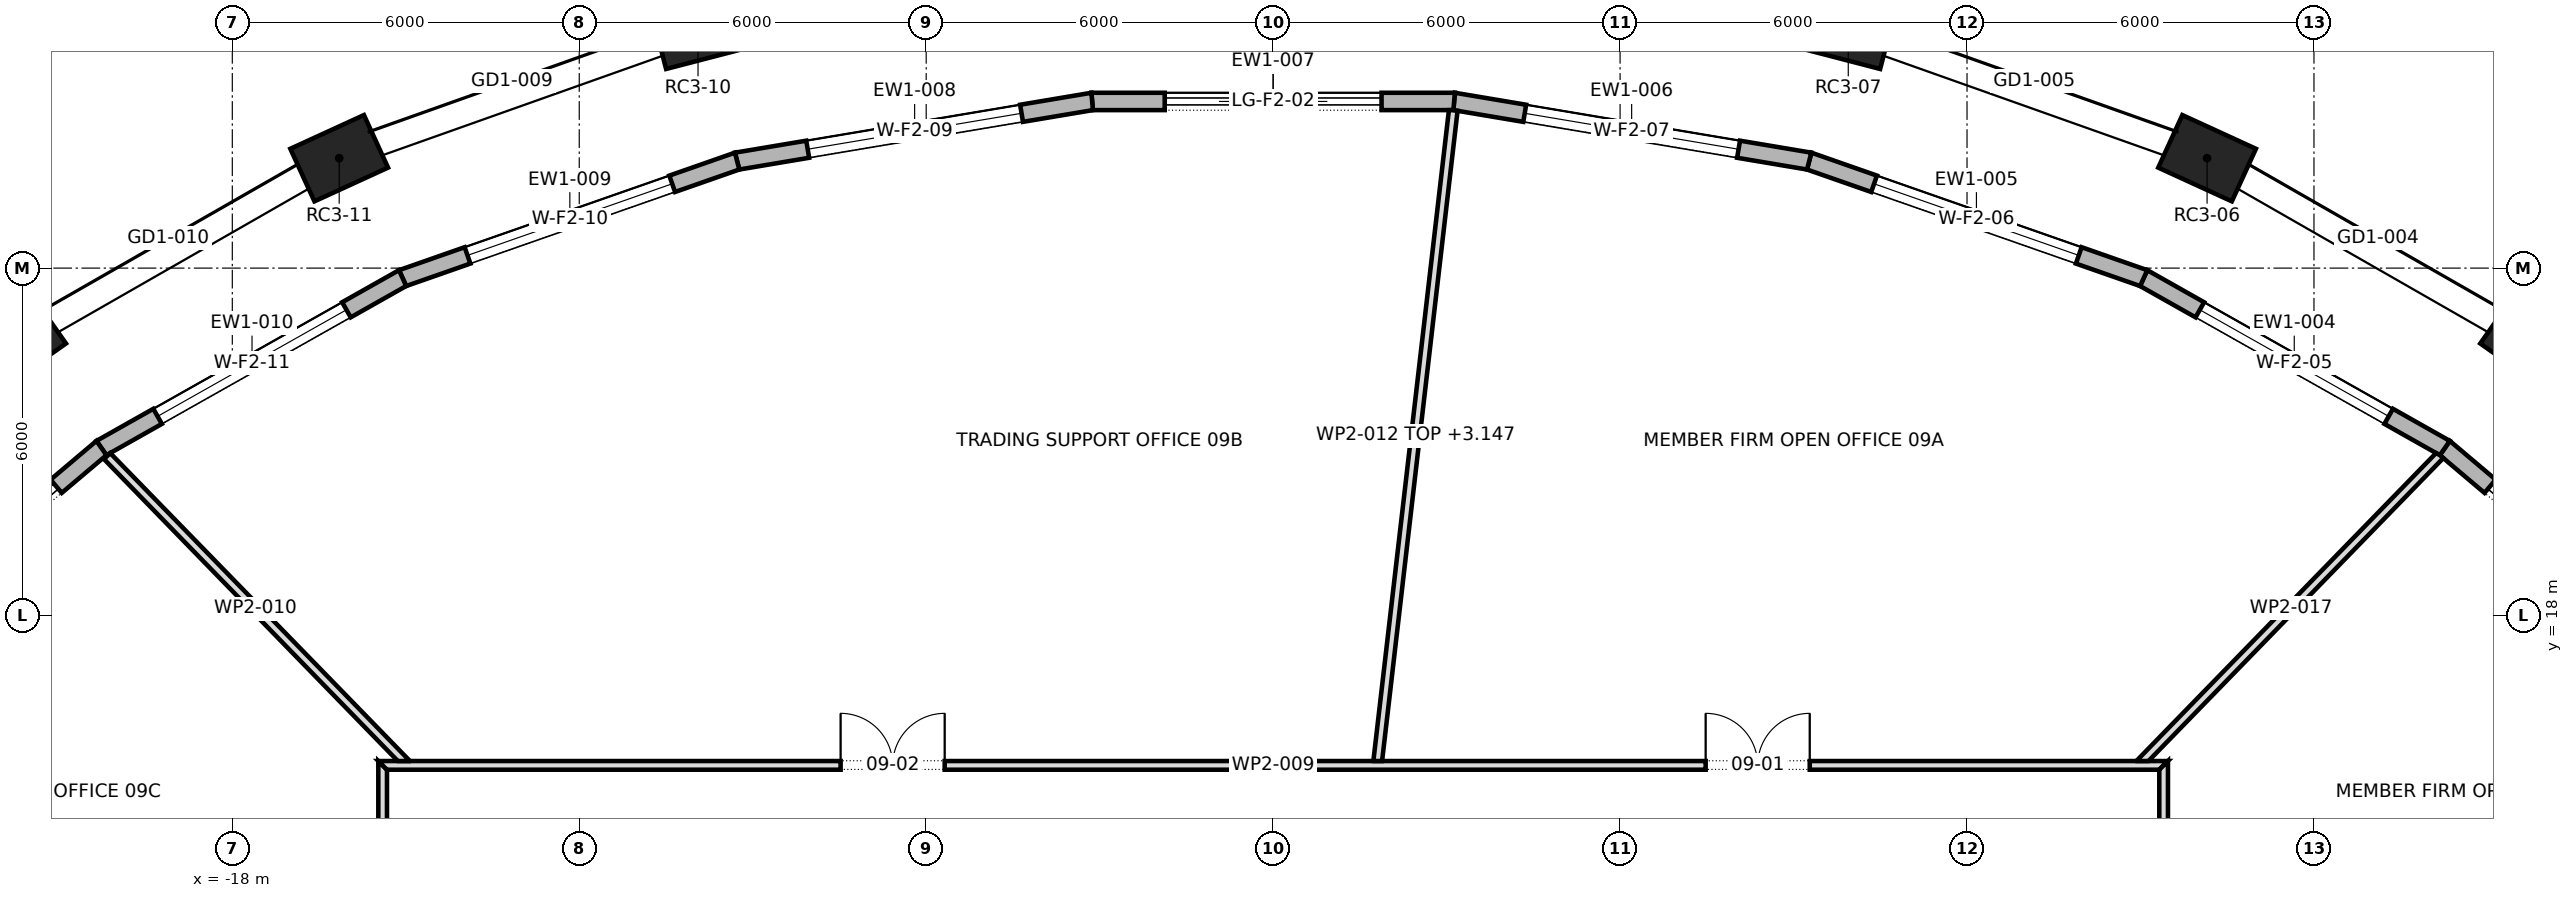
"""IFC4 building model, lengths in metres.
Left out: names, types, materials, properties, quantities, classifications, styles, units other than length and angle.
Written with IfcOpenShell. Run it as: python <this file> out.ifc"""

import sys

from ifc_helpers import new_model, si_unit, direction, frame, frame_2d, origin, origin_2d, place, context, subcontext, project, spatial, polyline, rectangle, outline, extrude, element, fill, save


model = new_model("IFC4")
c1 = context("Model", 3, precision=1e-05, world=origin(), true_north=direction((0.0, 1.0)))
c2 = subcontext(c1, "Body", "Model", "MODEL_VIEW")
j1 = project(units=[si_unit("LENGTHUNIT", "METRE"), si_unit("PLANEANGLEUNIT", "RADIAN")], contexts=[c1])
p1 = place(None, origin())
s1 = spatial("IfcSite", under=j1, at=p1, CompositionType="ELEMENT")
p2 = place(p1, origin())
s2 = spatial("IfcBuilding", under=s1, at=p2, CompositionType="ELEMENT")
p3 = place(p2, frame((0.0, 0.0, 138.1)))
s3 = spatial("IfcBuildingStorey", under=s2, at=p3, CompositionType="ELEMENT", Elevation=138.1)
for number, where, z_axis, x_axis in (
    (1, (21.736, 22.702, 0.0), (0.0, 0.0, 1.0), (-0.818, 0.575, 0.0)),
    (2, (16.152, 25.901, 0.0), (0.0, 0.0, 1.0), (-0.909, 0.417, 0.0)),
    (3, (9.946, 28.104, 0.0), (0.0, 0.0, 1.0), (-0.968, 0.252, 0.0)),
    (4, (-9.946, 28.104, 0.0), (0.0, 0.0, 1.0), (-0.968, -0.252, 0.0)),
    (5, (-16.152, 25.901, 0.0), (0.0, 0.0, 1.0), (-0.909, -0.417, 0.0)),
    (6, (-21.736, 22.702, 0.0), (0.0, 0.0, 1.0), (-0.818, -0.575, 0.0)),
):
    element("IfcColumn", number, at=place(p3, frame(where, z_axis=z_axis, x_axis=x_axis)), inside=s3, PredefinedType="COLUMN", context=c2, shape_type="SweptSolid", body=[
        extrude(rectangle(XDim=1.4, YDim=1.0, at=origin_2d()), origin(), (0.0, 0.0, 1.0), 4.2),
    ])
p4 = place(p3, frame((24.694, 17.146, 0.0), z_axis=(0.0, 0.0, 1.0), x_axis=(-0.763963973896, 0.645258898884, 0.0)))
e7 = element("IfcWall", 7, at=p4, inside=s3, PredefinedType="STANDARD", context=c2, shape_type="SweptSolid", body=[
    extrude(outline(polyline([(-0.015, -0.15), (5.814, -0.15), (5.786, 0.15), (0.015, 0.15), (-0.015, -0.15)])), origin(), (0.0, 0.0, 1.0), 3.9),
])
p5 = place(p4, frame((1.025, 0.0, 0.0)))
e8 = element("IfcOpeningElement", 8, at=p5, cuts=e7, PredefinedType="OPENING", context=c2, shape_type="SweptSolid", body=[
    extrude(rectangle(XDim=3.75, YDim=3.45, at=frame_2d((1.875, 1.725))), frame((0.0, 0.162, 0.0), z_axis=(0.0, -1.0, 0.0), x_axis=(1.0, 0.0, 0.0)), (0.0, 0.0, 1.0), 0.324),
])
p6 = place(p3, frame((20.263, 20.888, 0.0), z_axis=(0.0, 0.0, 1.0), x_axis=(-0.87090857883, 0.491445060327, 0.0)))
e9 = element("IfcWall", 9, at=p6, inside=s3, PredefinedType="STANDARD", context=c2, shape_type="SweptSolid", body=[
    extrude(outline(polyline([(-0.014, -0.15), (5.994, -0.15), (5.967, 0.15), (0.014, 0.15), (-0.014, -0.15)])), origin(), (0.0, 0.0, 1.0), 3.9),
])
p7 = place(p6, frame((1.115, 0.0, 0.6)))
e10 = element("IfcOpeningElement", 10, at=p7, cuts=e9, PredefinedType="OPENING", context=c2, shape_type="SweptSolid", body=[
    extrude(rectangle(XDim=3.75, YDim=2.85, at=frame_2d((1.875, 1.425))), frame((0.0, 0.162, 0.0), z_axis=(0.0, -1.0, 0.0), x_axis=(1.0, 0.0, 0.0)), (0.0, 0.0, 1.0), 0.324),
])
p8 = place(p3, frame((15.055, 23.827, 0.0), z_axis=(0.0, 0.0, 1.0), x_axis=(-0.943911133508, 0.330199594245, 0.0)))
e11 = element("IfcWall", 11, at=p8, inside=s3, PredefinedType="STANDARD", context=c2, shape_type="SweptSolid", body=[
    extrude(outline(polyline([(-0.013, -0.15), (6.141, -0.15), (6.116, 0.15), (0.013, 0.15), (-0.013, -0.15)])), origin(), (0.0, 0.0, 1.0), 3.9),
])
p9 = place(p8, frame((1.189, 0.0, 0.6)))
e12 = element("IfcOpeningElement", 12, at=p9, cuts=e11, PredefinedType="OPENING", context=c2, shape_type="SweptSolid", body=[
    extrude(rectangle(XDim=3.75, YDim=2.85, at=frame_2d((1.875, 1.425))), frame((0.0, 0.162, 0.0), z_axis=(0.0, -1.0, 0.0), x_axis=(1.0, 0.0, 0.0)), (0.0, 0.0, 1.0), 0.324),
])
p10 = place(p3, frame((9.27, 25.851, 0.0), z_axis=(0.0, 0.0, 1.0), x_axis=(-0.9861811474, 0.165670590368, 0.0)))
e13 = element("IfcWall", 13, at=p10, inside=s3, PredefinedType="STANDARD", context=c2, shape_type="SweptSolid", body=[
    extrude(outline(polyline([(-0.013, -0.15), (6.239, -0.15), (6.214, 0.15), (0.013, 0.15), (-0.013, -0.15)])), origin(), (0.0, 0.0, 1.0), 3.9),
])
p11 = place(p10, frame((1.238, 0.0, 0.6)))
e14 = element("IfcOpeningElement", 14, at=p11, cuts=e13, PredefinedType="OPENING", context=c2, shape_type="SweptSolid", body=[
    extrude(rectangle(XDim=3.75, YDim=2.85, at=frame_2d((1.875, 1.425))), frame((0.0, 0.162, 0.0), z_axis=(0.0, -1.0, 0.0), x_axis=(1.0, 0.0, 0.0)), (0.0, 0.0, 1.0), 0.324),
])
p12 = place(p3, frame((3.13, 26.882, 0.0), z_axis=(0.0, 0.0, 1.0), x_axis=(-1.0, 0.0, 0.0)))
e15 = element("IfcWall", 15, at=p12, inside=s3, PredefinedType="STANDARD", context=c2, shape_type="SweptSolid", body=[
    extrude(outline(polyline([(-0.012, -0.15), (6.272, -0.15), (6.247, 0.15), (0.012, 0.15), (-0.012, -0.15)])), origin(), (0.0, 0.0, 1.0), 3.9),
])
p13 = place(p12, frame((1.255, 0.0, 0.0)))
e16 = element("IfcOpeningElement", 16, at=p13, cuts=e15, PredefinedType="OPENING", context=c2, shape_type="SweptSolid", body=[
    extrude(rectangle(XDim=3.75, YDim=3.45, at=frame_2d((1.875, 1.725))), frame((0.0, 0.162, 0.0), z_axis=(0.0, -1.0, 0.0), x_axis=(1.0, 0.0, 0.0)), (0.0, 0.0, 1.0), 0.324),
])
p14 = place(p3, frame((-3.13, 26.882, 0.0), z_axis=(0.0, 0.0, 1.0), x_axis=(-0.9861811474, -0.165670590368, 0.0)))
e17 = element("IfcWall", 17, at=p14, inside=s3, PredefinedType="STANDARD", context=c2, shape_type="SweptSolid", body=[
    extrude(outline(polyline([(-0.012, -0.15), (6.239, -0.15), (6.213, 0.15), (0.012, 0.15), (-0.012, -0.15)])), origin(), (0.0, 0.0, 1.0), 3.9),
])
p15 = place(p14, frame((1.238, 0.0, 0.6)))
e18 = element("IfcOpeningElement", 18, at=p15, cuts=e17, PredefinedType="OPENING", context=c2, shape_type="SweptSolid", body=[
    extrude(rectangle(XDim=3.75, YDim=2.85, at=frame_2d((1.875, 1.425))), frame((0.0, 0.162, 0.0), z_axis=(0.0, -1.0, 0.0), x_axis=(1.0, 0.0, 0.0)), (0.0, 0.0, 1.0), 0.324),
])
p16 = place(p3, frame((-9.27, 25.851, 0.0), z_axis=(0.0, 0.0, 1.0), x_axis=(-0.943911133508, -0.330199594245, 0.0)))
e19 = element("IfcWall", 19, at=p16, inside=s3, PredefinedType="STANDARD", context=c2, shape_type="SweptSolid", body=[
    extrude(outline(polyline([(-0.013, -0.15), (6.142, -0.15), (6.115, 0.15), (0.013, 0.15), (-0.013, -0.15)])), origin(), (0.0, 0.0, 1.0), 3.9),
])
p17 = place(p16, frame((1.189, 0.0, 0.6)))
e20 = element("IfcOpeningElement", 20, at=p17, cuts=e19, PredefinedType="OPENING", context=c2, shape_type="SweptSolid", body=[
    extrude(rectangle(XDim=3.75, YDim=2.85, at=frame_2d((1.875, 1.425))), frame((0.0, 0.162, 0.0), z_axis=(0.0, -1.0, 0.0), x_axis=(1.0, 0.0, 0.0)), (0.0, 0.0, 1.0), 0.324),
])
p18 = place(p3, frame((-15.055, 23.827, 0.0), z_axis=(0.0, 0.0, 1.0), x_axis=(-0.87090857883, -0.491445060327, 0.0)))
e21 = element("IfcWall", 21, at=p18, inside=s3, PredefinedType="STANDARD", context=c2, shape_type="SweptSolid", body=[
    extrude(outline(polyline([(-0.013, -0.15), (5.994, -0.15), (5.966, 0.15), (0.013, 0.15), (-0.013, -0.15)])), origin(), (0.0, 0.0, 1.0), 3.9),
])
p19 = place(p18, frame((1.115, 0.0, 0.6)))
e22 = element("IfcOpeningElement", 22, at=p19, cuts=e21, PredefinedType="OPENING", context=c2, shape_type="SweptSolid", body=[
    extrude(rectangle(XDim=3.75, YDim=2.85, at=frame_2d((1.875, 1.425))), frame((0.0, 0.162, 0.0), z_axis=(0.0, -1.0, 0.0), x_axis=(1.0, 0.0, 0.0)), (0.0, 0.0, 1.0), 0.324),
])
p20 = place(p3, frame((-20.263, 20.888, 0.0), z_axis=(0.0, 0.0, 1.0), x_axis=(-0.763963973896, -0.645258898884, 0.0)))
e23 = element("IfcWall", 23, at=p20, inside=s3, PredefinedType="STANDARD", context=c2, shape_type="SweptSolid", body=[
    extrude(outline(polyline([(-0.014, -0.15), (5.815, -0.15), (5.785, 0.15), (0.014, 0.15), (-0.014, -0.15)])), origin(), (0.0, 0.0, 1.0), 3.9),
])
p21 = place(p20, frame((1.025, 0.0, 0.0)))
e24 = element("IfcOpeningElement", 24, at=p21, cuts=e23, PredefinedType="OPENING", context=c2, shape_type="SweptSolid", body=[
    extrude(rectangle(XDim=3.75, YDim=3.45, at=frame_2d((1.875, 1.725))), frame((0.0, 0.162, 0.0), z_axis=(0.0, -1.0, 0.0), x_axis=(1.0, 0.0, 0.0)), (0.0, 0.0, 1.0), 0.324),
])
p22 = place(p3, frame((-15.4, -3.16, 0.0), z_axis=(0.0, 0.0, 1.0), x_axis=(0.0, 1.0, 0.0)))
e25 = element("IfcWall", 25, at=p22, inside=s3, PredefinedType="PARTITIONING", context=c2, shape_type="SweptSolid", body=[
    extrude(outline(polyline([(0.0, -0.075), (1.848, -0.075), (3.697, -0.075), (5.545, -0.075), (7.394, -0.075), (9.242, -0.075), (11.091, -0.075), (12.939, -0.075), (14.788, -0.075), (16.636, -0.075), (18.485, -0.075), (18.635, 0.075), (16.771, 0.075), (14.908, 0.075), (13.044, 0.075), (11.181, 0.075), (9.317, 0.075), (7.454, 0.075), (5.59, 0.075), (3.727, 0.075), (1.864, 0.075), (0.0, 0.075), (0.0, -0.075)])), origin(), (0.0, 0.0, 1.0), 3.9),
])
p23 = place(p22, frame((11.935, 0.0, 0.0)))
e26 = element("IfcOpeningElement", 26, at=p23, cuts=e25, PredefinedType="OPENING", context=c2, shape_type="SweptSolid", body=[
    extrude(rectangle(XDim=1.8, YDim=2.1, at=frame_2d((0.9, 1.05))), frame((0.0, 0.087, 0.0), z_axis=(0.0, -1.0, 0.0), x_axis=(1.0, 0.0, 0.0)), (0.0, 0.0, 1.0), 0.174),
])
p24 = place(p22, frame((3.055, 0.0, 0.0)))
e27 = element("IfcOpeningElement", 27, at=p24, cuts=e25, PredefinedType="OPENING", context=c2, shape_type="SweptSolid", body=[
    extrude(rectangle(XDim=1.0, YDim=2.1, at=frame_2d((0.5, 1.05))), frame((0.0, 0.087, 0.0), z_axis=(0.0, -1.0, 0.0), x_axis=(1.0, 0.0, 0.0)), (0.0, 0.0, 1.0), 0.174),
])
p25 = place(p3, frame((-15.475, 15.4, 0.0), z_axis=(0.0, 0.0, 1.0), x_axis=(1.0, 0.0, 0.0)))
e28 = element("IfcWall", 28, at=p25, inside=s3, PredefinedType="PARTITIONING", context=c2, shape_type="SweptSolid", body=[
    extrude(outline(polyline([(0.15, -0.075), (2.066, -0.075), (3.981, -0.075), (5.897, -0.075), (7.812, -0.075), (9.728, -0.075), (11.644, -0.075), (13.56, -0.075), (15.475, -0.075), (17.391, -0.075), (19.306, -0.075), (21.222, -0.075), (23.138, -0.075), (25.053, -0.075), (26.969, -0.075), (28.885, -0.075), (30.8, -0.075), (30.95, 0.075), (29.016, 0.075), (27.081, 0.075), (25.147, 0.075), (23.212, 0.075), (21.278, 0.075), (19.344, 0.075), (17.409, 0.075), (15.475, 0.075), (13.541, 0.075), (11.606, 0.075), (9.672, 0.075), (7.738, 0.075), (5.803, 0.075), (3.869, 0.075), (1.935, 0.075), (0.0, 0.075), (0.15, -0.075)])), origin(), (0.0, 0.0, 1.0), 3.9),
])
p26 = place(p25, frame((22.955, 0.0, 0.0)))
e29 = element("IfcOpeningElement", 29, at=p26, cuts=e28, PredefinedType="OPENING", context=c2, shape_type="SweptSolid", body=[
    extrude(rectangle(XDim=1.8, YDim=2.1, at=frame_2d((0.9, 1.05))), frame((0.0, 0.087, 0.0), z_axis=(0.0, -1.0, 0.0), x_axis=(1.0, 0.0, 0.0)), (0.0, 0.0, 1.0), 0.174),
])
p27 = place(p25, frame((7.995, 0.0, 0.0)))
e30 = element("IfcOpeningElement", 30, at=p27, cuts=e28, PredefinedType="OPENING", context=c2, shape_type="SweptSolid", body=[
    extrude(rectangle(XDim=1.8, YDim=2.1, at=frame_2d((0.9, 1.05))), frame((0.0, 0.087, 0.0), z_axis=(0.0, -1.0, 0.0), x_axis=(1.0, 0.0, 0.0)), (0.0, 0.0, 1.0), 0.174),
])
p28 = place(p3, frame((-14.982, 15.423, 0.0), z_axis=(0.0, 0.0, 1.0), x_axis=(-0.69739829169, 0.716683767604, 0.0)))
e31 = element("IfcWall", 31, at=p28, inside=s3, PredefinedType="PARTITIONING", context=c2, shape_type="SweptSolid", body=[
    extrude(outline(polyline([(7.431, 0.075), (5.61, 0.075), (3.788, 0.075), (1.967, 0.075), (0.146, 0.075), (0.0, -0.075), (0.0, -0.075), (1.858, -0.075), (3.715, -0.075), (5.573, -0.075), (7.431, -0.075), (7.431, 0.075)])), origin(), (0.0, 0.0, 1.0), 3.9),
])
p29 = place(p3, frame((1.808, 15.467, 0.0), z_axis=(0.0, 0.0, 1.0), x_axis=(0.115308163836, 0.993329767677, 0.0)))
e32 = element("IfcWall", 32, at=p29, inside=s3, PredefinedType="PARTITIONING", context=c2, shape_type="SweptSolid", body=[
    extrude(outline(polyline([(0.017, -0.075), (1.904, -0.075), (3.791, -0.075), (5.677, -0.075), (7.564, -0.075), (9.451, -0.075), (11.338, -0.075), (11.338, -0.073), (11.338, 0.029), (11.333, 0.075), (9.444, 0.075), (7.555, 0.075), (5.667, 0.075), (3.778, 0.075), (1.889, 0.075), (0.0, 0.075), (0.0, 0.073), (0.017, -0.075)])), origin(), (0.0, 0.0, 1.0), 3.147),
])
p30 = place(p3, frame((15.4, -15.475, 0.0), z_axis=(0.0, 0.0, 1.0), x_axis=(0.0, 1.0, 0.0)))
e33 = element("IfcWall", 33, at=p30, inside=s3, PredefinedType="PARTITIONING", context=c2, shape_type="SweptSolid", body=[
    extrude(outline(polyline([(0.0, -0.075), (1.935, -0.075), (3.869, -0.075), (5.803, -0.075), (7.738, -0.075), (9.672, -0.075), (11.606, -0.075), (13.541, -0.075), (15.475, -0.075), (17.409, -0.075), (19.344, -0.075), (21.278, -0.075), (23.212, -0.075), (25.147, -0.075), (27.081, -0.075), (29.016, -0.075), (30.95, -0.075), (30.8, 0.075), (28.885, 0.075), (26.969, 0.075), (25.053, 0.075), (23.138, 0.075), (21.222, 0.075), (19.306, 0.075), (17.391, 0.075), (15.475, 0.075), (13.56, 0.075), (11.644, 0.075), (9.728, 0.075), (7.812, 0.075), (5.897, 0.075), (3.981, 0.075), (2.066, 0.075), (0.15, 0.075), (0.0, -0.075)])), origin(), (0.0, 0.0, 1.0), 3.9),
])
p31 = place(p30, frame((9.76, 0.0, 0.0)))
e34 = element("IfcOpeningElement", 34, at=p31, cuts=e33, PredefinedType="OPENING", context=c2, shape_type="SweptSolid", body=[
    extrude(rectangle(XDim=1.0, YDim=2.1, at=frame_2d((0.5, 1.05))), frame((0.0, 0.087, 0.0), z_axis=(0.0, -1.0, 0.0), x_axis=(1.0, 0.0, 0.0)), (0.0, 0.0, 1.0), 0.174),
])
p32 = place(p30, frame((15.21, 0.0, 0.0)))
e35 = element("IfcOpeningElement", 35, at=p32, cuts=e33, PredefinedType="OPENING", context=c2, shape_type="SweptSolid", body=[
    extrude(rectangle(XDim=1.0, YDim=2.1, at=frame_2d((0.5, 1.05))), frame((0.0, 0.087, 0.0), z_axis=(0.0, -1.0, 0.0), x_axis=(1.0, 0.0, 0.0)), (0.0, 0.0, 1.0), 0.174),
])
p33 = place(p30, frame((24.25, 0.0, 0.0)))
e36 = element("IfcOpeningElement", 36, at=p33, cuts=e33, PredefinedType="OPENING", context=c2, shape_type="SweptSolid", body=[
    extrude(rectangle(XDim=1.8, YDim=2.1, at=frame_2d((0.9, 1.05))), frame((0.0, 0.087, 0.0), z_axis=(0.0, -1.0, 0.0), x_axis=(1.0, 0.0, 0.0)), (0.0, 0.0, 1.0), 0.174),
])
p34 = place(p3, frame((20.182, 20.767, 0.0), z_axis=(0.0, 0.0, 1.0), x_axis=(-0.697398145205, -0.716683910148, 0.0)))
e37 = element("IfcWall", 37, at=p34, inside=s3, PredefinedType="PARTITIONING", context=c2, shape_type="SweptSolid", body=[
    extrude(outline(polyline([(7.456, -0.075), (7.456, -0.075), (7.363, 0.021), (7.363, 0.021), (7.311, 0.075), (5.483, 0.075), (3.655, 0.075), (1.828, 0.075), (0.0, 0.075), (0.0, 0.073), (0.005, -0.002), (0.024, -0.075), (1.882, -0.075), (3.74, -0.075), (5.598, -0.075), (7.456, -0.075)])), origin(), (0.0, 0.0, 1.0), 3.9),
])
p35 = place(p5, origin())
e38 = element("IfcDoor", 38, at=p35, inside=s3, OperationType="DOUBLE_DOOR_SLIDING", PredefinedType="DOOR", context=c2, shape_type="SweptSolid", body=[
    extrude(rectangle(XDim=3.75, YDim=3.45, at=frame_2d((1.875, 1.725))), frame((0.0, 0.025, 0.0), z_axis=(0.0, -1.0, 0.0), x_axis=(1.0, 0.0, 0.0)), (0.0, 0.0, 1.0), 0.05),
])
fill(e8, e38)
p36 = place(p7, origin())
e39 = element("IfcWindow", 39, at=p36, inside=s3, PartitioningType="TRIPLE_PANEL_VERTICAL", PredefinedType="WINDOW", context=c2, shape_type="SweptSolid", body=[
    extrude(rectangle(XDim=3.75, YDim=2.85, at=frame_2d((1.875, 1.425))), frame((0.0, 0.03, 0.0), z_axis=(0.0, -1.0, 0.0), x_axis=(1.0, 0.0, 0.0)), (0.0, 0.0, 1.0), 0.06),
])
fill(e10, e39)
p37 = place(p9, origin())
e40 = element("IfcWindow", 40, at=p37, inside=s3, PartitioningType="TRIPLE_PANEL_VERTICAL", PredefinedType="WINDOW", context=c2, shape_type="SweptSolid", body=[
    extrude(rectangle(XDim=3.75, YDim=2.85, at=frame_2d((1.875, 1.425))), frame((0.0, 0.03, 0.0), z_axis=(0.0, -1.0, 0.0), x_axis=(1.0, 0.0, 0.0)), (0.0, 0.0, 1.0), 0.06),
])
fill(e12, e40)
p38 = place(p11, origin())
e41 = element("IfcWindow", 41, at=p38, inside=s3, PartitioningType="TRIPLE_PANEL_VERTICAL", PredefinedType="WINDOW", context=c2, shape_type="SweptSolid", body=[
    extrude(rectangle(XDim=3.75, YDim=2.85, at=frame_2d((1.875, 1.425))), frame((0.0, 0.03, 0.0), z_axis=(0.0, -1.0, 0.0), x_axis=(1.0, 0.0, 0.0)), (0.0, 0.0, 1.0), 0.06),
])
fill(e14, e41)
p39 = place(p13, origin())
e42 = element("IfcDoor", 42, at=p39, inside=s3, OperationType="DOUBLE_DOOR_SLIDING", PredefinedType="DOOR", context=c2, shape_type="SweptSolid", body=[
    extrude(rectangle(XDim=3.75, YDim=3.45, at=frame_2d((1.875, 1.725))), frame((0.0, 0.025, 0.0), z_axis=(0.0, -1.0, 0.0), x_axis=(1.0, 0.0, 0.0)), (0.0, 0.0, 1.0), 0.05),
])
fill(e16, e42)
p40 = place(p15, origin())
e43 = element("IfcWindow", 43, at=p40, inside=s3, PartitioningType="TRIPLE_PANEL_VERTICAL", PredefinedType="WINDOW", context=c2, shape_type="SweptSolid", body=[
    extrude(rectangle(XDim=3.75, YDim=2.85, at=frame_2d((1.875, 1.425))), frame((0.0, 0.03, 0.0), z_axis=(0.0, -1.0, 0.0), x_axis=(1.0, 0.0, 0.0)), (0.0, 0.0, 1.0), 0.06),
])
fill(e18, e43)
p41 = place(p17, origin())
e44 = element("IfcWindow", 44, at=p41, inside=s3, PartitioningType="TRIPLE_PANEL_VERTICAL", PredefinedType="WINDOW", context=c2, shape_type="SweptSolid", body=[
    extrude(rectangle(XDim=3.75, YDim=2.85, at=frame_2d((1.875, 1.425))), frame((0.0, 0.03, 0.0), z_axis=(0.0, -1.0, 0.0), x_axis=(1.0, 0.0, 0.0)), (0.0, 0.0, 1.0), 0.06),
])
fill(e20, e44)
p42 = place(p19, origin())
e45 = element("IfcWindow", 45, at=p42, inside=s3, PartitioningType="TRIPLE_PANEL_VERTICAL", PredefinedType="WINDOW", context=c2, shape_type="SweptSolid", body=[
    extrude(rectangle(XDim=3.75, YDim=2.85, at=frame_2d((1.875, 1.425))), frame((0.0, 0.03, 0.0), z_axis=(0.0, -1.0, 0.0), x_axis=(1.0, 0.0, 0.0)), (0.0, 0.0, 1.0), 0.06),
])
fill(e22, e45)
p43 = place(p21, origin())
e46 = element("IfcDoor", 46, at=p43, inside=s3, OperationType="DOUBLE_DOOR_SLIDING", PredefinedType="DOOR", context=c2, shape_type="SweptSolid", body=[
    extrude(rectangle(XDim=3.75, YDim=3.45, at=frame_2d((1.875, 1.725))), frame((0.0, 0.025, 0.0), z_axis=(0.0, -1.0, 0.0), x_axis=(1.0, 0.0, 0.0)), (0.0, 0.0, 1.0), 0.05),
])
fill(e24, e46)
p44 = place(p26, origin())
e47 = element("IfcDoor", 47, at=p44, inside=s3, OperationType="DOUBLE_DOOR_SINGLE_SWING", PredefinedType="DOOR", context=c2, shape_type="SweptSolid", body=[
    extrude(rectangle(XDim=1.8, YDim=2.1, at=frame_2d((0.9, 1.05))), frame((0.0, 0.025, 0.0), z_axis=(0.0, -1.0, 0.0), x_axis=(1.0, 0.0, 0.0)), (0.0, 0.0, 1.0), 0.05),
])
fill(e29, e47)
p45 = place(p27, origin())
e48 = element("IfcDoor", 48, at=p45, inside=s3, OperationType="DOUBLE_DOOR_SINGLE_SWING", PredefinedType="DOOR", context=c2, shape_type="SweptSolid", body=[
    extrude(rectangle(XDim=1.8, YDim=2.1, at=frame_2d((0.9, 1.05))), frame((0.0, 0.025, 0.0), z_axis=(0.0, -1.0, 0.0), x_axis=(1.0, 0.0, 0.0)), (0.0, 0.0, 1.0), 0.05),
])
fill(e30, e48)
save(model, sys.argv[1])
